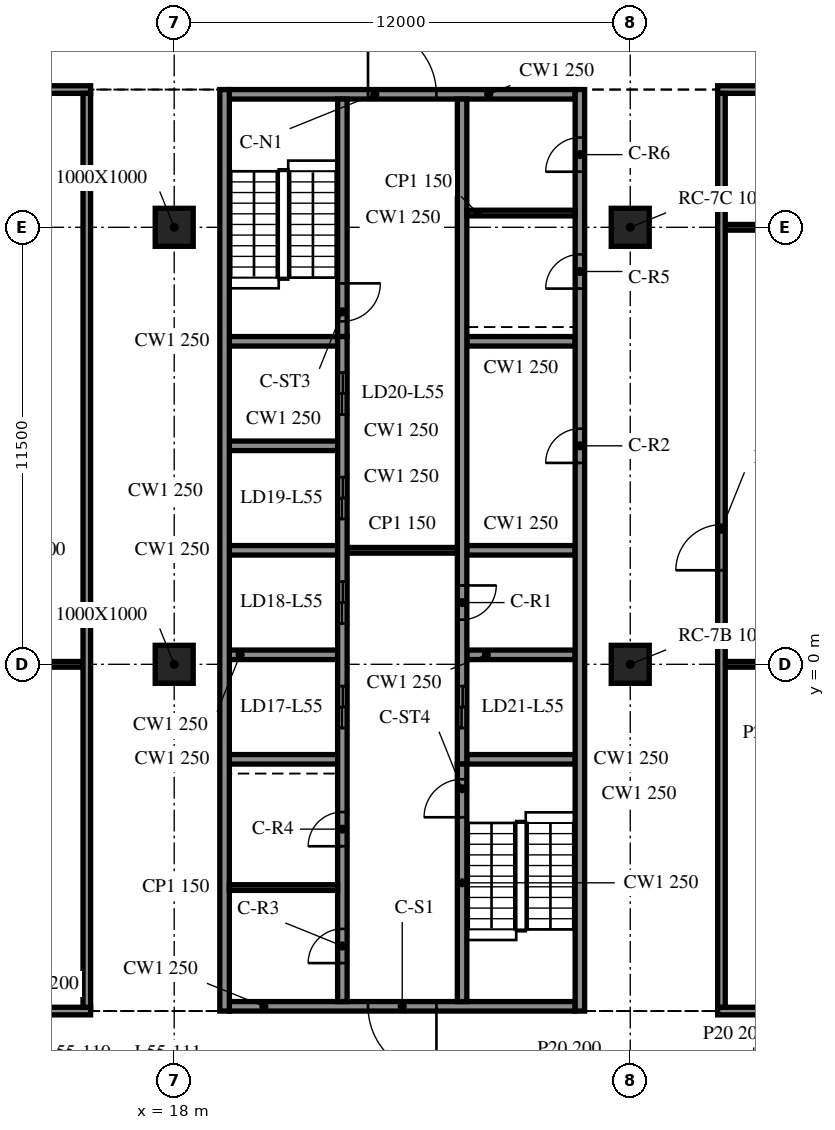
"""IFC4 building model, lengths in metres.
Left out: names, types, materials, properties, quantities, classifications, styles, units other than length and angle.
Written with IfcOpenShell. Run it as: python <this file> out.ifc"""

import sys

from ifc_helpers import new_model, si_unit, direction, frame, frame_2d, origin, origin_2d, place, context, subcontext, project, spatial, rectangle, extrude, element, fill, save


model = new_model("IFC4")
c1 = context("Model", 3, precision=1e-05, world=origin(), true_north=direction((0.0, 1.0)))
c2 = subcontext(c1, "Body", "Model", "MODEL_VIEW")
j1 = project(units=[si_unit("LENGTHUNIT", "METRE"), si_unit("PLANEANGLEUNIT", "RADIAN")], contexts=[c1])
p1 = place(None, origin())
s1 = spatial("IfcSite", under=j1, at=p1, CompositionType="ELEMENT")
p2 = place(p1, origin())
s2 = spatial("IfcBuilding", under=s1, at=p2, CompositionType="ELEMENT")
p3 = place(p2, frame((0.0, 0.0, 228.6)))
s3 = spatial("IfcBuildingStorey", under=s2, at=p3, CompositionType="ELEMENT", Elevation=228.6)
for number, where, z_axis, x_axis in (
    (1, (18.0, 0.0, -0.34), (0.0, 0.0, 1.0), (1.0, 0.0, 0.0)),
    (2, (18.0, 11.5, -0.34), (0.0, 0.0, 1.0), (1.0, 0.0, 0.0)),
    (3, (30.0, 0.0, -0.34), (0.0, 0.0, 1.0), (1.0, 0.0, 0.0)),
    (4, (30.0, 11.5, -0.34), (0.0, 0.0, 1.0), (1.0, 0.0, 0.0)),
):
    element("IfcColumn", number, at=place(p3, frame(where, z_axis=z_axis, x_axis=x_axis)), inside=s3, PredefinedType="COLUMN", context=c2, shape_type="SweptSolid", body=[
        extrude(rectangle(XDim=1.0, YDim=1.0, at=origin_2d()), origin(), (0.0, 0.0, 1.0), 3.8),
    ])
p4 = place(p3, frame((19.325, 15.125, 0.0), z_axis=(0.0, 0.0, 1.0), x_axis=(0.0, -1.0, 0.0)))
e5 = element("IfcWall", 5, at=p4, inside=s3, PredefinedType="SOLIDWALL", context=c2, shape_type="SweptSolid", body=[
    extrude(rectangle(XDim=24.25, YDim=0.25, at=frame_2d((12.125, 0.0))), origin(), (0.0, 0.0, 1.0), 3.46),
])
p5 = place(p3, frame((28.675, -9.125, 0.0), z_axis=(0.0, 0.0, 1.0), x_axis=(0.0, 1.0, 0.0)))
e6 = element("IfcWall", 6, at=p5, inside=s3, PredefinedType="SOLIDWALL", context=c2, shape_type="SweptSolid", body=[
    extrude(rectangle(XDim=24.25, YDim=0.25, at=frame_2d((12.125, 0.0))), origin(), (0.0, 0.0, 1.0), 3.46),
])
p6 = place(p5, frame((14.425, 0.0, 0.0)))
e7 = element("IfcOpeningElement", 7, at=p6, cuts=e6, PredefinedType="OPENING", context=c2, shape_type="SweptSolid", body=[
    extrude(rectangle(XDim=0.9, YDim=2.1, at=frame_2d((0.45, 1.05))), frame((0.0, 0.135, 0.0), z_axis=(0.0, -1.0, 0.0), x_axis=(1.0, 0.0, 0.0)), (0.0, 0.0, 1.0), 0.27),
])
p7 = place(p5, frame((19.012, 0.0, 0.0)))
e8 = element("IfcOpeningElement", 8, at=p7, cuts=e6, PredefinedType="OPENING", context=c2, shape_type="SweptSolid", body=[
    extrude(rectangle(XDim=0.9, YDim=2.1, at=frame_2d((0.45, 1.05))), frame((0.0, 0.135, 0.0), z_axis=(0.0, -1.0, 0.0), x_axis=(1.0, 0.0, 0.0)), (0.0, 0.0, 1.0), 0.27),
])
p8 = place(p5, frame((22.087, 0.0, 0.0)))
e9 = element("IfcOpeningElement", 9, at=p8, cuts=e6, PredefinedType="OPENING", context=c2, shape_type="SweptSolid", body=[
    extrude(rectangle(XDim=0.9, YDim=2.1, at=frame_2d((0.45, 1.05))), frame((0.0, 0.135, 0.0), z_axis=(0.0, -1.0, 0.0), x_axis=(1.0, 0.0, 0.0)), (0.0, 0.0, 1.0), 0.27),
])
p9 = place(p3, frame((28.55, -9.0, 0.0), z_axis=(0.0, 0.0, 1.0), x_axis=(-1.0, 0.0, 0.0)))
e10 = element("IfcWall", 10, at=p9, inside=s3, PredefinedType="SOLIDWALL", context=c2, shape_type="SweptSolid", body=[
    extrude(rectangle(XDim=9.1, YDim=0.25, at=frame_2d((4.55, 0.0))), origin(), (0.0, 0.0, 1.0), 3.46),
])
p10 = place(p9, frame((3.65, 0.0, 0.0)))
e11 = element("IfcOpeningElement", 11, at=p10, cuts=e10, PredefinedType="OPENING", context=c2, shape_type="SweptSolid", body=[
    extrude(rectangle(XDim=1.8, YDim=2.1, at=frame_2d((0.9, 1.05))), frame((0.0, 0.135, 0.0), z_axis=(0.0, -1.0, 0.0), x_axis=(1.0, 0.0, 0.0)), (0.0, 0.0, 1.0), 0.27),
])
p11 = place(p3, frame((19.45, 15.0, 0.0), z_axis=(0.0, 0.0, 1.0), x_axis=(1.0, 0.0, 0.0)))
e12 = element("IfcWall", 12, at=p11, inside=s3, PredefinedType="SOLIDWALL", context=c2, shape_type="SweptSolid", body=[
    extrude(rectangle(XDim=9.1, YDim=0.25, at=frame_2d((4.55, 0.0))), origin(), (0.0, 0.0, 1.0), 3.46),
])
p12 = place(p11, frame((3.65, 0.0, 0.0)))
e13 = element("IfcOpeningElement", 13, at=p12, cuts=e12, PredefinedType="OPENING", context=c2, shape_type="SweptSolid", body=[
    extrude(rectangle(XDim=1.8, YDim=2.1, at=frame_2d((0.9, 1.05))), frame((0.0, 0.135, 0.0), z_axis=(0.0, -1.0, 0.0), x_axis=(1.0, 0.0, 0.0)), (0.0, 0.0, 1.0), 0.27),
])
p13 = place(p3, frame((22.425, -8.875, 0.0), z_axis=(0.0, 0.0, 1.0), x_axis=(0.0, 1.0, 0.0)))
e14 = element("IfcWall", 14, at=p13, inside=s3, PredefinedType="SOLIDWALL", context=c2, shape_type="SweptSolid", body=[
    extrude(rectangle(XDim=17.5, YDim=0.25, at=frame_2d((8.75, 0.0))), origin(), (0.0, 0.0, 1.0), 3.46),
])
p14 = place(p13, frame((7.2, 0.0, 0.0)))
e15 = element("IfcOpeningElement", 15, at=p14, cuts=e14, PredefinedType="OPENING", context=c2, shape_type="SweptSolid", body=[
    extrude(rectangle(XDim=1.1, YDim=2.1, at=frame_2d((0.55, 1.05))), frame((0.0, 0.135, 0.0), z_axis=(0.0, -1.0, 0.0), x_axis=(1.0, 0.0, 0.0)), (0.0, 0.0, 1.0), 0.27),
])
p15 = place(p13, frame((9.95, 0.0, 0.0)))
e16 = element("IfcOpeningElement", 16, at=p15, cuts=e14, PredefinedType="OPENING", context=c2, shape_type="SweptSolid", body=[
    extrude(rectangle(XDim=1.1, YDim=2.1, at=frame_2d((0.55, 1.05))), frame((0.0, 0.135, 0.0), z_axis=(0.0, -1.0, 0.0), x_axis=(1.0, 0.0, 0.0)), (0.0, 0.0, 1.0), 0.27),
])
p16 = place(p13, frame((12.7, 0.0, 0.0)))
e17 = element("IfcOpeningElement", 17, at=p16, cuts=e14, PredefinedType="OPENING", context=c2, shape_type="SweptSolid", body=[
    extrude(rectangle(XDim=1.1, YDim=2.1, at=frame_2d((0.55, 1.05))), frame((0.0, 0.135, 0.0), z_axis=(0.0, -1.0, 0.0), x_axis=(1.0, 0.0, 0.0)), (0.0, 0.0, 1.0), 0.27),
])
p17 = place(p13, frame((15.45, 0.0, 0.0)))
e18 = element("IfcOpeningElement", 18, at=p17, cuts=e14, PredefinedType="OPENING", context=c2, shape_type="SweptSolid", body=[
    extrude(rectangle(XDim=1.1, YDim=2.1, at=frame_2d((0.55, 1.05))), frame((0.0, 0.135, 0.0), z_axis=(0.0, -1.0, 0.0), x_axis=(1.0, 0.0, 0.0)), (0.0, 0.0, 1.0), 0.27),
])
p18 = place(p13, frame((1.012, 0.0, 0.0)))
e19 = element("IfcOpeningElement", 19, at=p18, cuts=e14, PredefinedType="OPENING", context=c2, shape_type="SweptSolid", body=[
    extrude(rectangle(XDim=0.9, YDim=2.1, at=frame_2d((0.45, 1.05))), frame((0.0, 0.135, 0.0), z_axis=(0.0, -1.0, 0.0), x_axis=(1.0, 0.0, 0.0)), (0.0, 0.0, 1.0), 0.27),
])
p19 = place(p13, frame((4.087, 0.0, 0.0)))
e20 = element("IfcOpeningElement", 20, at=p19, cuts=e14, PredefinedType="OPENING", context=c2, shape_type="SweptSolid", body=[
    extrude(rectangle(XDim=0.9, YDim=2.1, at=frame_2d((0.45, 1.05))), frame((0.0, 0.135, 0.0), z_axis=(0.0, -1.0, 0.0), x_axis=(1.0, 0.0, 0.0)), (0.0, 0.0, 1.0), 0.27),
])
p20 = place(p3, frame((22.425, 14.875, 0.0), z_axis=(0.0, 0.0, 1.0), x_axis=(0.0, -1.0, 0.0)))
e21 = element("IfcWall", 21, at=p20, inside=s3, PredefinedType="SOLIDWALL", context=c2, shape_type="SweptSolid", body=[
    extrude(rectangle(XDim=6.25, YDim=0.25, at=frame_2d((3.125, 0.0))), origin(), (0.0, 0.0, 1.0), 3.46),
])
p21 = place(p20, frame((4.85, 0.0, 0.0)))
e22 = element("IfcOpeningElement", 22, at=p21, cuts=e21, PredefinedType="OPENING", context=c2, shape_type="SweptSolid", body=[
    extrude(rectangle(XDim=1.0, YDim=2.1, at=frame_2d((0.5, 1.05))), frame((0.0, 0.135, 0.0), z_axis=(0.0, -1.0, 0.0), x_axis=(1.0, 0.0, 0.0)), (0.0, 0.0, 1.0), 0.27),
])
p22 = place(p3, frame((25.575, -8.875, 0.0), z_axis=(0.0, 0.0, 1.0), x_axis=(0.0, 1.0, 0.0)))
e23 = element("IfcWall", 23, at=p22, inside=s3, PredefinedType="SOLIDWALL", context=c2, shape_type="SweptSolid", body=[
    extrude(rectangle(XDim=6.25, YDim=0.25, at=frame_2d((3.125, 0.0))), origin(), (0.0, 0.0, 1.0), 3.46),
])
p23 = place(p22, frame((4.85, 0.0, 0.0)))
e24 = element("IfcOpeningElement", 24, at=p23, cuts=e23, PredefinedType="OPENING", context=c2, shape_type="SweptSolid", body=[
    extrude(rectangle(XDim=1.0, YDim=2.1, at=frame_2d((0.5, 1.05))), frame((0.0, 0.135, 0.0), z_axis=(0.0, -1.0, 0.0), x_axis=(1.0, 0.0, 0.0)), (0.0, 0.0, 1.0), 0.27),
])
p24 = place(p3, frame((25.575, 14.875, 0.0), z_axis=(0.0, 0.0, 1.0), x_axis=(0.0, -1.0, 0.0)))
e25 = element("IfcWall", 25, at=p24, inside=s3, PredefinedType="SOLIDWALL", context=c2, shape_type="SweptSolid", body=[
    extrude(rectangle(XDim=17.5, YDim=0.25, at=frame_2d((8.75, 0.0))), origin(), (0.0, 0.0, 1.0), 3.46),
])
p25 = place(p24, frame((15.45, 0.0, 0.0)))
e26 = element("IfcOpeningElement", 26, at=p25, cuts=e25, PredefinedType="OPENING", context=c2, shape_type="SweptSolid", body=[
    extrude(rectangle(XDim=1.1, YDim=2.1, at=frame_2d((0.55, 1.05))), frame((0.0, 0.135, 0.0), z_axis=(0.0, -1.0, 0.0), x_axis=(1.0, 0.0, 0.0)), (0.0, 0.0, 1.0), 0.27),
])
p26 = place(p24, frame((12.8, 0.0, 0.0)))
e27 = element("IfcOpeningElement", 27, at=p26, cuts=e25, PredefinedType="OPENING", context=c2, shape_type="SweptSolid", body=[
    extrude(rectangle(XDim=0.9, YDim=2.1, at=frame_2d((0.45, 1.05))), frame((0.0, 0.135, 0.0), z_axis=(0.0, -1.0, 0.0), x_axis=(1.0, 0.0, 0.0)), (0.0, 0.0, 1.0), 0.27),
])
for number, where, z_axis, x_axis in (
    (28, (19.45, -2.5, 0.0), (0.0, 0.0, 1.0), (1.0, 0.0, 0.0)),
    (29, (19.45, 0.25, 0.0), (0.0, 0.0, 1.0), (1.0, 0.0, 0.0)),
    (30, (19.45, 3.0, 0.0), (0.0, 0.0, 1.0), (1.0, 0.0, 0.0)),
    (31, (19.45, 5.75, 0.0), (0.0, 0.0, 1.0), (1.0, 0.0, 0.0)),
    (32, (19.45, 8.5, 0.0), (0.0, 0.0, 1.0), (1.0, 0.0, 0.0)),
    (33, (25.7, -2.5, 0.0), (0.0, 0.0, 1.0), (1.0, 0.0, 0.0)),
    (34, (25.7, 0.25, 0.0), (0.0, 0.0, 1.0), (1.0, 0.0, 0.0)),
    (35, (25.7, 3.0, 0.0), (0.0, 0.0, 1.0), (1.0, 0.0, 0.0)),
    (36, (25.7, 8.5, 0.0), (0.0, 0.0, 1.0), (1.0, 0.0, 0.0)),
):
    element("IfcWall", number, at=place(p3, frame(where, z_axis=z_axis, x_axis=x_axis)), inside=s3, PredefinedType="SOLIDWALL", context=c2, shape_type="SweptSolid", body=[
        extrude(rectangle(XDim=2.85, YDim=0.25, at=frame_2d((1.425, 0.0))), origin(), (0.0, 0.0, 1.0), 3.46),
    ])
p27 = place(p3, frame((22.55, 3.0, 0.0), z_axis=(0.0, 0.0, 1.0), x_axis=(1.0, 0.0, 0.0)))
e37 = element("IfcWall", 37, at=p27, inside=s3, PredefinedType="PARTITIONING", context=c2, shape_type="SweptSolid", body=[
    extrude(rectangle(XDim=2.9, YDim=0.15, at=frame_2d((1.45, 0.0))), origin(), (0.0, 0.0, 1.0), 3.46),
])
for number, where, z_axis, x_axis in (
    (38, (19.45, -5.875, 0.0), (0.0, 0.0, 1.0), (1.0, 0.0, 0.0)),
    (39, (25.7, 11.875, 0.0), (0.0, 0.0, 1.0), (1.0, 0.0, 0.0)),
):
    element("IfcWall", number, at=place(p3, frame(where, z_axis=z_axis, x_axis=x_axis)), inside=s3, PredefinedType="PARTITIONING", context=c2, shape_type="SweptSolid", body=[
        extrude(rectangle(XDim=2.85, YDim=0.15, at=frame_2d((1.425, 0.0))), origin(), (0.0, 0.0, 1.0), 3.46),
    ])
p28 = place(p3, frame((8.1, -9.125, 0.0), z_axis=(0.0, 0.0, 1.0), x_axis=(1.0, 0.0, 0.0)))
e40 = element("IfcWall", 40, at=p28, inside=s3, PredefinedType="PARTITIONING", context=c2, shape_type="SweptSolid", body=[
    extrude(rectangle(XDim=7.7, YDim=0.2, at=frame_2d((3.85, 0.0))), origin(), (0.0, 0.0, 1.0), 3.46),
])
p29 = place(p28, frame((3.3, 0.0, 0.0)))
e41 = element("IfcOpeningElement", 41, at=p29, cuts=e40, PredefinedType="OPENING", context=c2, shape_type="SweptSolid", body=[
    extrude(rectangle(XDim=0.9, YDim=2.1, at=frame_2d((0.45, 1.05))), frame((0.0, 0.11, 0.0), z_axis=(0.0, -1.0, 0.0), x_axis=(1.0, 0.0, 0.0)), (0.0, 0.0, 1.0), 0.22),
])
p30 = place(p3, frame((32.3, -9.125, 0.0), z_axis=(0.0, 0.0, 1.0), x_axis=(1.0, 0.0, 0.0)))
e42 = element("IfcWall", 42, at=p30, inside=s3, PredefinedType="PARTITIONING", context=c2, shape_type="SweptSolid", body=[
    extrude(rectangle(XDim=21.675, YDim=0.2, at=frame_2d((10.837, 0.0))), origin(), (0.0, 0.0, 1.0), 3.46),
])
p31 = place(p30, frame((10.1, 0.0, 0.0)))
e43 = element("IfcOpeningElement", 43, at=p31, cuts=e42, PredefinedType="OPENING", context=c2, shape_type="SweptSolid", body=[
    extrude(rectangle(XDim=1.2, YDim=2.1, at=frame_2d((0.6, 1.05))), frame((0.0, 0.11, 0.0), z_axis=(0.0, -1.0, 0.0), x_axis=(1.0, 0.0, 0.0)), (0.0, 0.0, 1.0), 0.22),
])
p32 = place(p3, frame((8.3, 0.0, 0.0), z_axis=(0.0, 0.0, 1.0), x_axis=(1.0, 0.0, 0.0)))
e44 = element("IfcWall", 44, at=p32, inside=s3, PredefinedType="PARTITIONING", context=c2, shape_type="SweptSolid", body=[
    extrude(rectangle(XDim=7.3, YDim=0.15, at=frame_2d((3.65, 0.0))), origin(), (0.0, 0.0, 1.0), 3.46),
])
for number, where, z_axis, x_axis in (
    (45, (32.5, 0.0, 0.0), (0.0, 0.0, 1.0), (1.0, 0.0, 0.0)),
    (46, (32.5, 11.5, 0.0), (0.0, 0.0, 1.0), (1.0, 0.0, 0.0)),
):
    element("IfcWall", number, at=place(p3, frame(where, z_axis=z_axis, x_axis=x_axis)), inside=s3, PredefinedType="PARTITIONING", context=c2, shape_type="SweptSolid", body=[
        extrude(rectangle(XDim=9.0, YDim=0.15, at=frame_2d((4.5, 0.0))), origin(), (0.0, 0.0, 1.0), 3.46),
    ])
p33 = place(p3, frame((8.1, 15.125, 0.0), z_axis=(0.0, 0.0, 1.0), x_axis=(1.0, 0.0, 0.0)))
e47 = element("IfcWall", 47, at=p33, inside=s3, PredefinedType="PARTITIONING", context=c2, shape_type="SweptSolid", body=[
    extrude(rectangle(XDim=7.7, YDim=0.2, at=frame_2d((3.85, 0.0))), origin(), (0.0, 0.0, 1.0), 3.46),
])
p34 = place(p3, frame((32.3, 15.125, 0.0), z_axis=(0.0, 0.0, 1.0), x_axis=(1.0, 0.0, 0.0)))
e48 = element("IfcWall", 48, at=p34, inside=s3, PredefinedType="PARTITIONING", context=c2, shape_type="SweptSolid", body=[
    extrude(rectangle(XDim=21.675, YDim=0.2, at=frame_2d((10.837, 0.0))), origin(), (0.0, 0.0, 1.0), 3.46),
])
p35 = place(p34, frame((10.3, 0.0, 0.0)))
e49 = element("IfcOpeningElement", 49, at=p35, cuts=e48, PredefinedType="OPENING", context=c2, shape_type="SweptSolid", body=[
    extrude(rectangle(XDim=1.0, YDim=2.1, at=frame_2d((0.5, 1.05))), frame((0.0, 0.11, 0.0), z_axis=(0.0, -1.0, 0.0), x_axis=(1.0, 0.0, 0.0)), (0.0, 0.0, 1.0), 0.22),
])
p36 = place(p3, frame((15.7, -9.025, 0.0), z_axis=(0.0, 0.0, 1.0), x_axis=(0.0, 1.0, 0.0)))
e50 = element("IfcWall", 50, at=p36, inside=s3, PredefinedType="PARTITIONING", context=c2, shape_type="SweptSolid", body=[
    extrude(rectangle(XDim=24.05, YDim=0.2, at=frame_2d((12.025, 0.0))), origin(), (0.0, 0.0, 1.0), 3.46),
])
p37 = place(p3, frame((32.4, -9.025, 0.0), z_axis=(0.0, 0.0, 1.0), x_axis=(0.0, 1.0, 0.0)))
e51 = element("IfcWall", 51, at=p37, inside=s3, PredefinedType="PARTITIONING", context=c2, shape_type="SweptSolid", body=[
    extrude(rectangle(XDim=24.05, YDim=0.2, at=frame_2d((12.025, 0.0))), origin(), (0.0, 0.0, 1.0), 3.46),
])
p38 = place(p37, frame((11.5, 0.0, 0.0)))
e52 = element("IfcOpeningElement", 52, at=p38, cuts=e51, PredefinedType="OPENING", context=c2, shape_type="SweptSolid", body=[
    extrude(rectangle(XDim=1.2, YDim=2.1, at=frame_2d((0.6, 1.05))), frame((0.0, 0.11, 0.0), z_axis=(0.0, -1.0, 0.0), x_axis=(1.0, 0.0, 0.0)), (0.0, 0.0, 1.0), 0.22),
])
p39 = place(p10, origin())
e53 = element("IfcDoor", 53, at=p39, inside=s3, OperationType="DOUBLE_DOOR_SINGLE_SWING", PredefinedType="DOOR", context=c2, shape_type="SweptSolid", body=[
    extrude(rectangle(XDim=1.8, YDim=2.1, at=frame_2d((0.9, 1.05))), frame((0.0, 0.025, 0.0), z_axis=(0.0, -1.0, 0.0), x_axis=(1.0, 0.0, 0.0)), (0.0, 0.0, 1.0), 0.05),
])
fill(e11, e53)
p40 = place(p12, origin())
e54 = element("IfcDoor", 54, at=p40, inside=s3, OperationType="DOUBLE_DOOR_SINGLE_SWING", PredefinedType="DOOR", context=c2, shape_type="SweptSolid", body=[
    extrude(rectangle(XDim=1.8, YDim=2.1, at=frame_2d((0.9, 1.05))), frame((0.0, 0.025, 0.0), z_axis=(0.0, -1.0, 0.0), x_axis=(1.0, 0.0, 0.0)), (0.0, 0.0, 1.0), 0.05),
])
fill(e13, e54)
p41 = place(p25, origin())
e55 = element("IfcDoor", 55, at=p41, inside=s3, OperationType="DOUBLE_DOOR_SLIDING", PredefinedType="DOOR", context=c2, shape_type="SweptSolid", body=[
    extrude(rectangle(XDim=1.1, YDim=2.1, at=frame_2d((0.55, 1.05))), frame((0.0, 0.025, 0.0), z_axis=(0.0, -1.0, 0.0), x_axis=(1.0, 0.0, 0.0)), (0.0, 0.0, 1.0), 0.05),
])
fill(e26, e55)
p42 = place(p14, origin())
e56 = element("IfcDoor", 56, at=p42, inside=s3, OperationType="DOUBLE_DOOR_SLIDING", PredefinedType="DOOR", context=c2, shape_type="SweptSolid", body=[
    extrude(rectangle(XDim=1.1, YDim=2.1, at=frame_2d((0.55, 1.05))), frame((0.0, 0.025, 0.0), z_axis=(0.0, -1.0, 0.0), x_axis=(1.0, 0.0, 0.0)), (0.0, 0.0, 1.0), 0.05),
])
fill(e15, e56)
p43 = place(p15, origin())
e57 = element("IfcDoor", 57, at=p43, inside=s3, OperationType="DOUBLE_DOOR_SLIDING", PredefinedType="DOOR", context=c2, shape_type="SweptSolid", body=[
    extrude(rectangle(XDim=1.1, YDim=2.1, at=frame_2d((0.55, 1.05))), frame((0.0, 0.025, 0.0), z_axis=(0.0, -1.0, 0.0), x_axis=(1.0, 0.0, 0.0)), (0.0, 0.0, 1.0), 0.05),
])
fill(e16, e57)
p44 = place(p16, origin())
e58 = element("IfcDoor", 58, at=p44, inside=s3, OperationType="DOUBLE_DOOR_SLIDING", PredefinedType="DOOR", context=c2, shape_type="SweptSolid", body=[
    extrude(rectangle(XDim=1.1, YDim=2.1, at=frame_2d((0.55, 1.05))), frame((0.0, 0.025, 0.0), z_axis=(0.0, -1.0, 0.0), x_axis=(1.0, 0.0, 0.0)), (0.0, 0.0, 1.0), 0.05),
])
fill(e17, e58)
p45 = place(p17, origin())
e59 = element("IfcDoor", 59, at=p45, inside=s3, OperationType="DOUBLE_DOOR_SLIDING", PredefinedType="DOOR", context=c2, shape_type="SweptSolid", body=[
    extrude(rectangle(XDim=1.1, YDim=2.1, at=frame_2d((0.55, 1.05))), frame((0.0, 0.025, 0.0), z_axis=(0.0, -1.0, 0.0), x_axis=(1.0, 0.0, 0.0)), (0.0, 0.0, 1.0), 0.05),
])
fill(e18, e59)
p46 = place(p26, origin())
e60 = element("IfcDoor", 60, at=p46, inside=s3, OperationType="SINGLE_SWING_LEFT", PredefinedType="DOOR", context=c2, shape_type="SweptSolid", body=[
    extrude(rectangle(XDim=0.9, YDim=2.1, at=frame_2d((0.45, 1.05))), frame((0.0, 0.025, 0.0), z_axis=(0.0, -1.0, 0.0), x_axis=(1.0, 0.0, 0.0)), (0.0, 0.0, 1.0), 0.05),
])
fill(e27, e60)
p47 = place(p6, origin())
e61 = element("IfcDoor", 61, at=p47, inside=s3, OperationType="SINGLE_SWING_RIGHT", PredefinedType="DOOR", context=c2, shape_type="SweptSolid", body=[
    extrude(rectangle(XDim=0.9, YDim=2.1, at=frame_2d((0.45, 1.05))), frame((0.0, 0.025, 0.0), z_axis=(0.0, -1.0, 0.0), x_axis=(1.0, 0.0, 0.0)), (0.0, 0.0, 1.0), 0.05),
])
fill(e7, e61)
p48 = place(p18, origin())
e62 = element("IfcDoor", 62, at=p48, inside=s3, OperationType="SINGLE_SWING_LEFT", PredefinedType="DOOR", context=c2, shape_type="SweptSolid", body=[
    extrude(rectangle(XDim=0.9, YDim=2.1, at=frame_2d((0.45, 1.05))), frame((0.0, 0.025, 0.0), z_axis=(0.0, -1.0, 0.0), x_axis=(1.0, 0.0, 0.0)), (0.0, 0.0, 1.0), 0.05),
])
fill(e19, e62)
p49 = place(p19, origin())
e63 = element("IfcDoor", 63, at=p49, inside=s3, OperationType="SINGLE_SWING_RIGHT", PredefinedType="DOOR", context=c2, shape_type="SweptSolid", body=[
    extrude(rectangle(XDim=0.9, YDim=2.1, at=frame_2d((0.45, 1.05))), frame((0.0, 0.025, 0.0), z_axis=(0.0, -1.0, 0.0), x_axis=(1.0, 0.0, 0.0)), (0.0, 0.0, 1.0), 0.05),
])
fill(e20, e63)
p50 = place(p7, origin())
e64 = element("IfcDoor", 64, at=p50, inside=s3, OperationType="SINGLE_SWING_LEFT", PredefinedType="DOOR", context=c2, shape_type="SweptSolid", body=[
    extrude(rectangle(XDim=0.9, YDim=2.1, at=frame_2d((0.45, 1.05))), frame((0.0, 0.025, 0.0), z_axis=(0.0, -1.0, 0.0), x_axis=(1.0, 0.0, 0.0)), (0.0, 0.0, 1.0), 0.05),
])
fill(e8, e64)
p51 = place(p8, origin())
e65 = element("IfcDoor", 65, at=p51, inside=s3, OperationType="SINGLE_SWING_RIGHT", PredefinedType="DOOR", context=c2, shape_type="SweptSolid", body=[
    extrude(rectangle(XDim=0.9, YDim=2.1, at=frame_2d((0.45, 1.05))), frame((0.0, 0.025, 0.0), z_axis=(0.0, -1.0, 0.0), x_axis=(1.0, 0.0, 0.0)), (0.0, 0.0, 1.0), 0.05),
])
fill(e9, e65)
p52 = place(p21, origin())
e66 = element("IfcDoor", 66, at=p52, inside=s3, OperationType="SINGLE_SWING_LEFT", PredefinedType="DOOR", context=c2, shape_type="SweptSolid", body=[
    extrude(rectangle(XDim=1.0, YDim=2.1, at=frame_2d((0.5, 1.05))), frame((0.0, 0.025, 0.0), z_axis=(0.0, -1.0, 0.0), x_axis=(1.0, 0.0, 0.0)), (0.0, 0.0, 1.0), 0.05),
])
fill(e22, e66)
p53 = place(p23, origin())
e67 = element("IfcDoor", 67, at=p53, inside=s3, OperationType="SINGLE_SWING_RIGHT", PredefinedType="DOOR", context=c2, shape_type="SweptSolid", body=[
    extrude(rectangle(XDim=1.0, YDim=2.1, at=frame_2d((0.5, 1.05))), frame((0.0, 0.025, 0.0), z_axis=(0.0, -1.0, 0.0), x_axis=(1.0, 0.0, 0.0)), (0.0, 0.0, 1.0), 0.05),
])
fill(e24, e67)
p54 = place(p38, origin())
e68 = element("IfcDoor", 68, at=p54, inside=s3, OperationType="SINGLE_SWING_LEFT", PredefinedType="DOOR", context=c2, shape_type="SweptSolid", body=[
    extrude(rectangle(XDim=1.2, YDim=2.1, at=frame_2d((0.6, 1.05))), frame((0.0, 0.025, 0.0), z_axis=(0.0, -1.0, 0.0), x_axis=(1.0, 0.0, 0.0)), (0.0, 0.0, 1.0), 0.05),
])
fill(e52, e68)
save(model, sys.argv[1])
